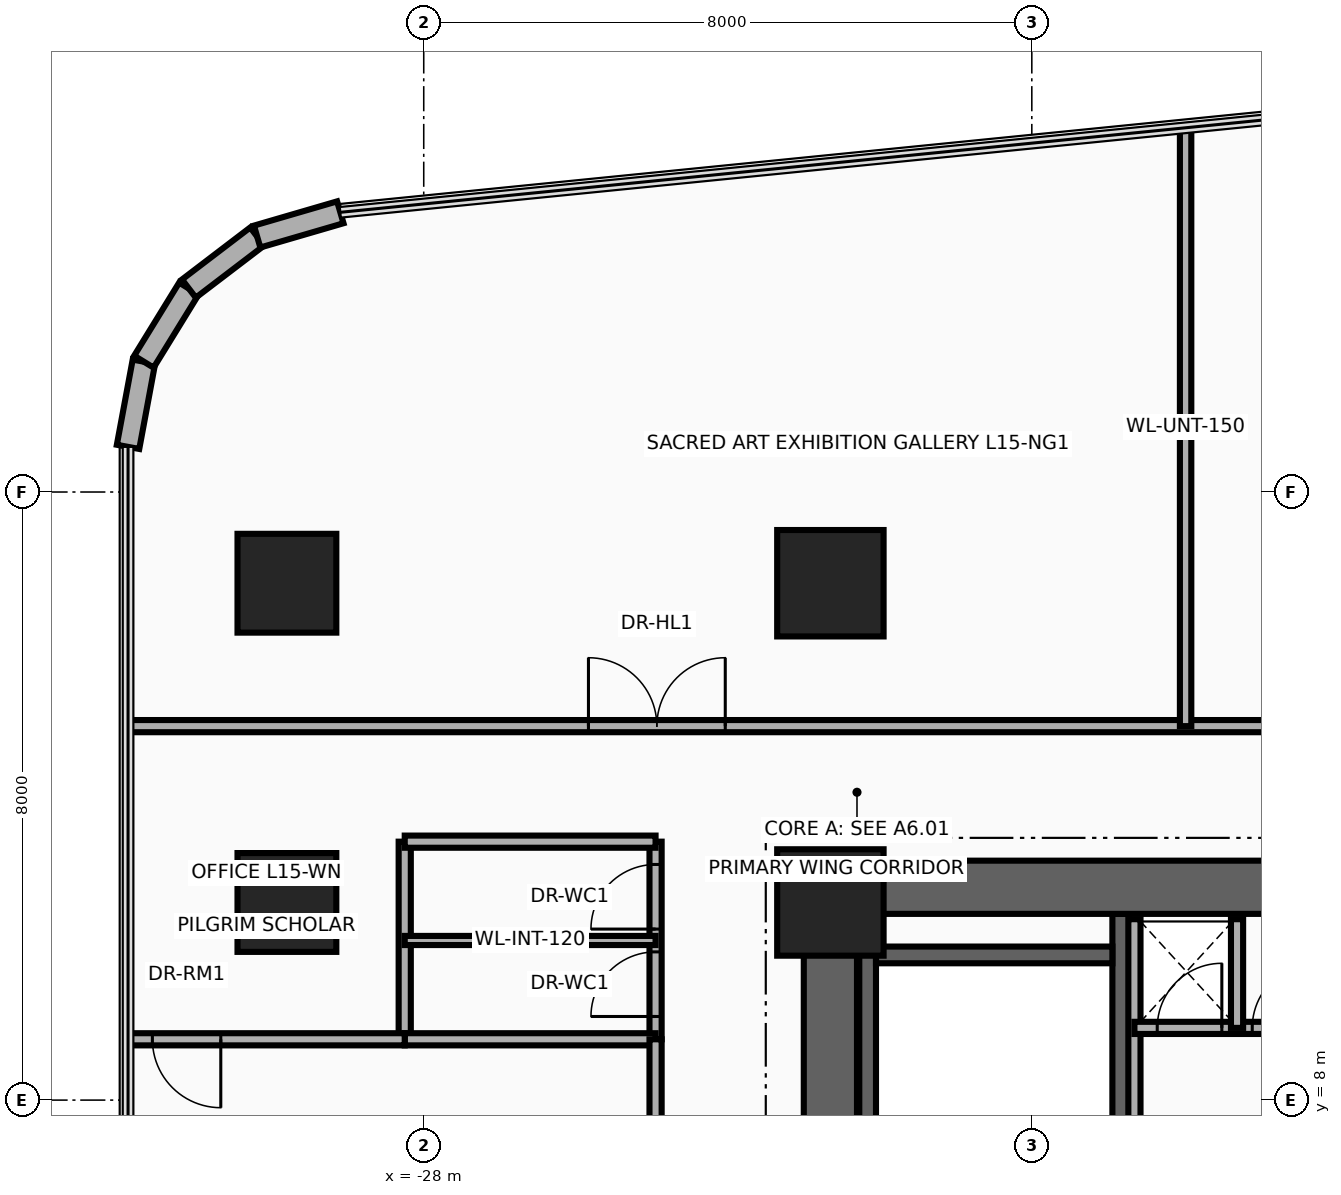
"""IFC4 building model, lengths in metres.
Left out: names, types, materials, properties, quantities, classifications, styles, units other than length and angle.
Written with IfcOpenShell. Run it as: python <this file> out.ifc"""

import sys

from ifc_helpers import new_model, si_unit, direction, frame, frame_2d, origin, origin_2d, place, context, subcontext, project, spatial, rectangle, circle, extrude, source, transform, mapped, element, fill, save


model = new_model("IFC4")
c1 = context("Model", 3, precision=1e-05, world=origin(), true_north=direction((0.0, 1.0)))
c2 = subcontext(c1, "Body", "Model", "MODEL_VIEW")
j1 = project(units=[si_unit("LENGTHUNIT", "METRE"), si_unit("PLANEANGLEUNIT", "RADIAN")], contexts=[c1])
p1 = place(None, origin())
s1 = spatial("IfcSite", under=j1, at=p1, CompositionType="ELEMENT")
p2 = place(p1, origin())
s2 = spatial("IfcBuilding", under=s1, at=p2, CompositionType="ELEMENT")
p3 = place(p2, frame((0.0, 0.0, 63.0)))
s3 = spatial("IfcBuildingStorey", under=s2, at=p3, CompositionType="ELEMENT", Elevation=63.0)
for number, where, z_axis, x_axis in (
    (1, (-22.16, 1.78, 0.0), (0.0, 0.0, 1.0), (0.0, 1.0, 0.0)),
    (2, (-18.83, 1.78, 0.0), (0.0, 0.0, 1.0), (0.0, 1.0, 0.0)),
):
    element("IfcWall", number, at=place(p3, frame(where, z_axis=z_axis, x_axis=x_axis)), inside=s3, PredefinedType="SHEAR", context=c2, shape_type="SweptSolid", body=[
        extrude(rectangle(XDim=8.67, YDim=0.22, at=frame_2d((4.335, 0.0))), origin(), (0.0, 0.0, 1.0), 3.46),
    ])
p4 = place(p3, frame((-22.05, 9.91, 0.0), z_axis=(0.0, 0.0, 1.0), x_axis=(1.0, 0.0, 0.0)))
e3 = element("IfcWall", 3, at=p4, inside=s3, PredefinedType="SHEAR", context=c2, shape_type="SweptSolid", body=[
    extrude(rectangle(XDim=3.11, YDim=0.22, at=frame_2d((1.555, 0.0))), origin(), (0.0, 0.0, 1.0), 3.46),
])
p5 = place(p3, frame((-22.65, -11.15, 0.0), z_axis=(0.0, 0.0, 1.0), x_axis=(0.0, 1.0, 0.0)))
e4 = element("IfcWall", 4, at=p5, inside=s3, PredefinedType="SHEAR", context=c2, shape_type="SweptSolid", body=[
    extrude(rectangle(XDim=22.3, YDim=0.7, at=frame_2d((11.15, 0.0))), origin(), (0.0, 0.0, 1.0), 3.46),
])
p6 = place(p3, frame((-22.65, 10.8, 0.0), z_axis=(0.0, 0.0, 1.0), x_axis=(1.0, 0.0, 0.0)))
e5 = element("IfcWall", 5, at=p6, inside=s3, PredefinedType="SHEAR", context=c2, shape_type="SweptSolid", body=[
    extrude(rectangle(XDim=10.25, YDim=0.7, at=frame_2d((5.125, 0.0))), origin(), (0.0, 0.0, 1.0), 3.46),
])
m1 = source(origin(), c2, "Body", "SweptSolid", [
    extrude(circle(Radius=0.65, at=origin_2d()), origin(), (0.0, 0.0, 1.0), 3.7),
])
p7 = place(p3, frame((-29.8, 10.6, 0.0), z_axis=(0.0, 0.0, 1.0), x_axis=(1.0, 0.0, 0.0)))
e6 = element("IfcColumn", 6, at=p7, inside=s3, PredefinedType="COLUMN", context=c2, shape_type="MappedRepresentation", body=[
    mapped(m1, transform((0.0, 0.0, 0.0), x_axis=(1.0, 0.0, 0.0), y_axis=(0.0, 1.0, 0.0), z_axis=(0.0, 0.0, 1.0), scale=1.0)),
])
m2 = source(origin(), c2, "Body", "SweptSolid", [
    extrude(rectangle(XDim=1.4, YDim=1.4, at=origin_2d()), origin(), (0.0, 0.0, 1.0), 3.7),
])
p8 = place(p3, frame((-22.65, 10.6, 0.0), z_axis=(0.0, 0.0, 1.0), x_axis=(1.0, 0.0, 0.0)))
e7 = element("IfcColumn", 7, at=p8, inside=s3, PredefinedType="COLUMN", context=c2, shape_type="MappedRepresentation", body=[
    mapped(m2, transform((0.0, 0.0, 0.0), x_axis=(1.0, 0.0, 0.0), y_axis=(0.0, 1.0, 0.0), z_axis=(0.0, 0.0, 1.0), scale=1.0)),
])
p9 = place(p3, frame((-29.8, 14.8, 0.0), z_axis=(0.0, 0.0, 1.0), x_axis=(1.0, 0.0, 0.0)))
e8 = element("IfcColumn", 8, at=p9, inside=s3, PredefinedType="COLUMN", context=c2, shape_type="MappedRepresentation", body=[
    mapped(m1, transform((0.0, 0.0, 0.0), x_axis=(1.0, 0.0, 0.0), y_axis=(0.0, 1.0, 0.0), z_axis=(0.0, 0.0, 1.0), scale=1.0)),
])
p10 = place(p3, frame((-22.65, 14.8, 0.0), z_axis=(0.0, 0.0, 1.0), x_axis=(1.0, 0.0, 0.0)))
e9 = element("IfcColumn", 9, at=p10, inside=s3, PredefinedType="COLUMN", context=c2, shape_type="MappedRepresentation", body=[
    mapped(m2, transform((0.0, 0.0, 0.0), x_axis=(1.0, 0.0, 0.0), y_axis=(0.0, 1.0, 0.0), z_axis=(0.0, 0.0, 1.0), scale=1.0)),
])
p11 = place(p3, frame((-31.89, 16.594, 0.0), z_axis=(0.0, 0.0, 1.0), x_axis=(0.182748995683, 0.9831596028, 0.0)))
e10 = element("IfcWall", 10, at=p11, inside=s3, PredefinedType="SOLIDWALL", context=c2, shape_type="SweptSolid", body=[
    extrude(rectangle(XDim=1.14, YDim=0.3, at=frame_2d((0.57, 0.0))), origin(), (0.0, 0.0, 1.0), 3.46),
])
p12 = place(p3, frame((-31.682, 17.714, 0.0), z_axis=(0.0, 0.0, 1.0), x_axis=(0.524157723014, 0.8516212077, 0.0)))
e11 = element("IfcWall", 11, at=p12, inside=s3, PredefinedType="SOLIDWALL", context=c2, shape_type="SweptSolid", body=[
    extrude(rectangle(XDim=1.129, YDim=0.3, at=frame_2d((0.565, 0.0))), origin(), (0.0, 0.0, 1.0), 3.46),
])
p13 = place(p3, frame((-31.09, 18.676, 0.0), z_axis=(0.0, 0.0, 1.0), x_axis=(0.795253002434, 0.606277710393, 0.0)))
e12 = element("IfcWall", 12, at=p13, inside=s3, PredefinedType="SOLIDWALL", context=c2, shape_type="SweptSolid", body=[
    extrude(rectangle(XDim=1.129, YDim=0.3, at=frame_2d((0.564, 0.0))), origin(), (0.0, 0.0, 1.0), 3.46),
])
p14 = place(p3, frame((-30.192, 19.361, 0.0), z_axis=(0.0, 0.0, 1.0), x_axis=(0.960071941549, 0.279753225271, 0.0)))
e13 = element("IfcWall", 13, at=p14, inside=s3, PredefinedType="SOLIDWALL", context=c2, shape_type="SweptSolid", body=[
    extrude(rectangle(XDim=1.14, YDim=0.3, at=frame_2d((0.57, 0.0))), origin(), (0.0, 0.0, 1.0), 3.46),
])
p15 = place(p3, frame((-18.65, 7.45, 0.0), z_axis=(0.0, 0.0, 1.0), x_axis=(0.0, 1.0, 0.0)))
e14 = element("IfcWall", 14, at=p15, inside=s3, PredefinedType="PARTITIONING", context=c2, shape_type="SweptSolid", body=[
    extrude(rectangle(XDim=2.93, YDim=0.16, at=frame_2d((1.465, 0.0))), origin(), (0.0, 0.0, 1.0), 3.46),
])
p16 = place(p3, frame((-18.65, 8.95, 0.0), z_axis=(0.0, 0.0, 1.0), x_axis=(1.0, 0.0, 0.0)))
e15 = element("IfcWall", 15, at=p16, inside=s3, PredefinedType="PARTITIONING", context=c2, shape_type="SweptSolid", body=[
    extrude(rectangle(XDim=5.5, YDim=0.16, at=frame_2d((2.75, 0.0))), origin(), (0.0, 0.0, 1.0), 3.46),
])
p17 = place(p16, frame((0.3, 0.0, 0.0)))
e16 = element("IfcOpeningElement", 16, at=p17, cuts=e15, PredefinedType="OPENING", context=c2, shape_type="SweptSolid", body=[
    extrude(rectangle(XDim=0.85, YDim=2.05, at=frame_2d((0.425, 1.025))), frame((0.0, 0.095, 0.0), z_axis=(0.0, -1.0, 0.0), x_axis=(1.0, 0.0, 0.0)), (0.0, 0.0, 1.0), 0.19),
])
p18 = place(p16, frame((1.55, 0.0, 0.0)))
e17 = element("IfcOpeningElement", 17, at=p18, cuts=e15, PredefinedType="OPENING", context=c2, shape_type="SweptSolid", body=[
    extrude(rectangle(XDim=0.85, YDim=2.05, at=frame_2d((0.425, 1.025))), frame((0.0, 0.095, 0.0), z_axis=(0.0, -1.0, 0.0), x_axis=(1.0, 0.0, 0.0)), (0.0, 0.0, 1.0), 0.19),
])
p19 = place(p16, frame((2.95, 0.0, 0.0)))
e18 = element("IfcOpeningElement", 18, at=p19, cuts=e15, PredefinedType="OPENING", context=c2, shape_type="SweptSolid", body=[
    extrude(rectangle(XDim=0.85, YDim=2.05, at=frame_2d((0.425, 1.025))), frame((0.0, 0.095, 0.0), z_axis=(0.0, -1.0, 0.0), x_axis=(1.0, 0.0, 0.0)), (0.0, 0.0, 1.0), 0.19),
])
p20 = place(p16, frame((4.35, 0.0, 0.0)))
e19 = element("IfcOpeningElement", 19, at=p20, cuts=e15, PredefinedType="OPENING", context=c2, shape_type="SweptSolid", body=[
    extrude(rectangle(XDim=0.85, YDim=2.05, at=frame_2d((0.425, 1.025))), frame((0.0, 0.095, 0.0), z_axis=(0.0, -1.0, 0.0), x_axis=(1.0, 0.0, 0.0)), (0.0, 0.0, 1.0), 0.19),
])
p21 = place(p3, frame((-17.3, 8.95, 0.0), z_axis=(0.0, 0.0, 1.0), x_axis=(0.0, 1.0, 0.0)))
e20 = element("IfcWall", 20, at=p21, inside=s3, PredefinedType="PARTITIONING", context=c2, shape_type="SweptSolid", body=[
    extrude(rectangle(XDim=1.43, YDim=0.16, at=frame_2d((0.715, 0.0))), origin(), (0.0, 0.0, 1.0), 3.46),
])
p22 = place(p3, frame((-28.25, 8.8, 0.0), z_axis=(0.0, 0.0, 1.0), x_axis=(0.0, 1.0, 0.0)))
e21 = element("IfcWall", 21, at=p22, inside=s3, PredefinedType="PARTITIONING", context=c2, shape_type="SweptSolid", body=[
    extrude(rectangle(XDim=2.6, YDim=0.16, at=frame_2d((1.3, 0.0))), origin(), (0.0, 0.0, 1.0), 2.583),
])
p23 = place(p3, frame((-24.95, 8.8, 0.0), z_axis=(0.0, 0.0, 1.0), x_axis=(0.0, 1.0, 0.0)))
e22 = element("IfcWall", 22, at=p23, inside=s3, PredefinedType="PARTITIONING", context=c2, shape_type="SweptSolid", body=[
    extrude(rectangle(XDim=2.6, YDim=0.16, at=frame_2d((1.3, 0.0))), origin(), (0.0, 0.0, 1.0), 2.583),
])
p24 = place(p23, frame((0.3, 0.0, 0.0)))
e23 = element("IfcOpeningElement", 23, at=p24, cuts=e22, PredefinedType="OPENING", context=c2, shape_type="SweptSolid", body=[
    extrude(rectangle(XDim=0.85, YDim=2.1, at=frame_2d((0.425, 1.05))), frame((0.0, 0.095, 0.0), z_axis=(0.0, -1.0, 0.0), x_axis=(1.0, 0.0, 0.0)), (0.0, 0.0, 1.0), 0.19),
])
p25 = place(p23, frame((1.45, 0.0, 0.0)))
e24 = element("IfcOpeningElement", 24, at=p25, cuts=e22, PredefinedType="OPENING", context=c2, shape_type="SweptSolid", body=[
    extrude(rectangle(XDim=0.85, YDim=2.1, at=frame_2d((0.425, 1.05))), frame((0.0, 0.095, 0.0), z_axis=(0.0, -1.0, 0.0), x_axis=(1.0, 0.0, 0.0)), (0.0, 0.0, 1.0), 0.19),
])
for number, where, z_axis, x_axis in (
    (25, (-28.25, 8.8, 0.0), (0.0, 0.0, 1.0), (1.0, 0.0, 0.0)),
    (26, (-28.25, 11.4, 0.0), (0.0, 0.0, 1.0), (1.0, 0.0, 0.0)),
):
    element("IfcWall", number, at=place(p3, frame(where, z_axis=z_axis, x_axis=x_axis)), inside=s3, PredefinedType="PARTITIONING", context=c2, shape_type="SweptSolid", body=[
        extrude(rectangle(XDim=3.3, YDim=0.16, at=frame_2d((1.65, 0.0))), origin(), (0.0, 0.0, 1.0), 3.46),
    ])
p26 = place(p3, frame((-28.25, 10.1, 0.0), z_axis=(0.0, 0.0, 1.0), x_axis=(1.0, 0.0, 0.0)))
e27 = element("IfcWall", 27, at=p26, inside=s3, PredefinedType="PARTITIONING", context=c2, shape_type="SweptSolid", body=[
    extrude(rectangle(XDim=3.3, YDim=0.12, at=frame_2d((1.65, 0.0))), origin(), (0.0, 0.0, 1.0), 3.46),
])
p27 = place(p3, frame((-24.95, -11.42, 0.0), z_axis=(0.0, 0.0, 1.0), x_axis=(0.0, 1.0, 0.0)))
e28 = element("IfcWall", 28, at=p27, inside=s3, PredefinedType="PARTITIONING", context=c2, shape_type="SweptSolid", body=[
    extrude(rectangle(XDim=20.22, YDim=0.16, at=frame_2d((10.11, 0.0))), origin(), (0.0, 0.0, 1.0), 2.583),
])
p28 = place(p27, frame((4.155, 0.0, 0.0)))
e29 = element("IfcOpeningElement", 29, at=p28, cuts=e28, PredefinedType="OPENING", context=c2, shape_type="SweptSolid", body=[
    extrude(rectangle(XDim=1.8, YDim=2.15, at=frame_2d((0.9, 1.075))), frame((0.0, 0.095, 0.0), z_axis=(0.0, -1.0, 0.0), x_axis=(1.0, 0.0, 0.0)), (0.0, 0.0, 1.0), 0.19),
])
p29 = place(p27, frame((14.265, 0.0, 0.0)))
e30 = element("IfcOpeningElement", 30, at=p29, cuts=e28, PredefinedType="OPENING", context=c2, shape_type="SweptSolid", body=[
    extrude(rectangle(XDim=1.8, YDim=2.15, at=frame_2d((0.9, 1.075))), frame((0.0, 0.095, 0.0), z_axis=(0.0, -1.0, 0.0), x_axis=(1.0, 0.0, 0.0)), (0.0, 0.0, 1.0), 0.19),
])
p30 = place(p3, frame((-31.89, 8.8, 0.0), z_axis=(0.0, 0.0, 1.0), x_axis=(1.0, 0.0, 0.0)))
e31 = element("IfcWall", 31, at=p30, inside=s3, PredefinedType="PARTITIONING", context=c2, shape_type="SweptSolid", body=[
    extrude(rectangle(XDim=3.64, YDim=0.16, at=frame_2d((1.82, 0.0))), origin(), (0.0, 0.0, 1.0), 2.896),
])
p31 = place(p30, frame((0.32, 0.0, 0.0)))
e32 = element("IfcOpeningElement", 32, at=p31, cuts=e31, PredefinedType="OPENING", context=c2, shape_type="SweptSolid", body=[
    extrude(rectangle(XDim=0.9, YDim=2.1, at=frame_2d((0.45, 1.05))), frame((0.0, 0.095, 0.0), z_axis=(0.0, -1.0, 0.0), x_axis=(1.0, 0.0, 0.0)), (0.0, 0.0, 1.0), 0.19),
])
p32 = place(p3, frame((-31.89, 12.92, 0.0), z_axis=(0.0, 0.0, 1.0), x_axis=(1.0, 0.0, 0.0)))
e33 = element("IfcWall", 33, at=p32, inside=s3, PredefinedType="PARTITIONING", context=c2, shape_type="SweptSolid", body=[
    extrude(rectangle(XDim=45.44, YDim=0.16, at=frame_2d((22.72, 0.0))), origin(), (0.0, 0.0, 1.0), 2.583),
])
p33 = place(p32, frame((6.057, 0.0, 0.0)))
e34 = element("IfcOpeningElement", 34, at=p33, cuts=e33, PredefinedType="OPENING", context=c2, shape_type="SweptSolid", body=[
    extrude(rectangle(XDim=1.8, YDim=2.15, at=frame_2d((0.9, 1.075))), frame((0.0, 0.095, 0.0), z_axis=(0.0, -1.0, 0.0), x_axis=(1.0, 0.0, 0.0)), (0.0, 0.0, 1.0), 0.19),
])
p34 = place(p32, frame((20.895, 0.0, 0.0)))
e35 = element("IfcOpeningElement", 35, at=p34, cuts=e33, PredefinedType="OPENING", context=c2, shape_type="SweptSolid", body=[
    extrude(rectangle(XDim=1.8, YDim=2.15, at=frame_2d((0.9, 1.075))), frame((0.0, 0.095, 0.0), z_axis=(0.0, -1.0, 0.0), x_axis=(1.0, 0.0, 0.0)), (0.0, 0.0, 1.0), 0.19),
])
p35 = place(p32, frame((36.658, 0.0, 0.0)))
e36 = element("IfcOpeningElement", 36, at=p35, cuts=e33, PredefinedType="OPENING", context=c2, shape_type="SweptSolid", body=[
    extrude(rectangle(XDim=1.8, YDim=2.15, at=frame_2d((0.9, 1.075))), frame((0.0, 0.095, 0.0), z_axis=(0.0, -1.0, 0.0), x_axis=(1.0, 0.0, 0.0)), (0.0, 0.0, 1.0), 0.19),
])
p36 = place(p3, frame((-17.977, 12.92, 0.0), z_axis=(0.0, 0.0, 1.0), x_axis=(0.0, 1.0, 0.0)))
e37 = element("IfcWall", 37, at=p36, inside=s3, PredefinedType="PARTITIONING", context=c2, shape_type="SweptSolid", body=[
    extrude(rectangle(XDim=7.872, YDim=0.15, at=frame_2d((3.936, 0.0))), origin(), (0.0, 0.0, 1.0), 2.583),
])
p37 = place(p17, origin())
e38 = element("IfcDoor", 38, at=p37, inside=s3, OperationType="SINGLE_SWING_LEFT", PredefinedType="DOOR", context=c2, shape_type="SweptSolid", body=[
    extrude(rectangle(XDim=0.85, YDim=2.05, at=frame_2d((0.425, 1.025))), frame((0.0, 0.025, 0.0), z_axis=(0.0, -1.0, 0.0), x_axis=(1.0, 0.0, 0.0)), (0.0, 0.0, 1.0), 0.05),
])
fill(e16, e38)
p38 = place(p18, origin())
e39 = element("IfcDoor", 39, at=p38, inside=s3, OperationType="SINGLE_SWING_RIGHT", PredefinedType="DOOR", context=c2, shape_type="SweptSolid", body=[
    extrude(rectangle(XDim=0.85, YDim=2.05, at=frame_2d((0.425, 1.025))), frame((0.0, 0.025, 0.0), z_axis=(0.0, -1.0, 0.0), x_axis=(1.0, 0.0, 0.0)), (0.0, 0.0, 1.0), 0.05),
])
fill(e17, e39)
p39 = place(p24, origin())
e40 = element("IfcDoor", 40, at=p39, inside=s3, OperationType="SINGLE_SWING_LEFT", PredefinedType="DOOR", context=c2, shape_type="SweptSolid", body=[
    extrude(rectangle(XDim=0.85, YDim=2.1, at=frame_2d((0.425, 1.05))), frame((0.0, 0.025, 0.0), z_axis=(0.0, -1.0, 0.0), x_axis=(1.0, 0.0, 0.0)), (0.0, 0.0, 1.0), 0.05),
])
fill(e23, e40)
p40 = place(p25, origin())
e41 = element("IfcDoor", 41, at=p40, inside=s3, OperationType="SINGLE_SWING_RIGHT", PredefinedType="DOOR", context=c2, shape_type="SweptSolid", body=[
    extrude(rectangle(XDim=0.85, YDim=2.1, at=frame_2d((0.425, 1.05))), frame((0.0, 0.025, 0.0), z_axis=(0.0, -1.0, 0.0), x_axis=(1.0, 0.0, 0.0)), (0.0, 0.0, 1.0), 0.05),
])
fill(e24, e41)
p41 = place(p31, frame((0.9, 0.0, 0.0), z_axis=(0.0, 0.0, 1.0), x_axis=(-1.0, 0.0, 0.0)))
e42 = element("IfcDoor", 42, at=p41, inside=s3, OperationType="SINGLE_SWING_LEFT", PredefinedType="DOOR", context=c2, shape_type="SweptSolid", body=[
    extrude(rectangle(XDim=0.9, YDim=2.1, at=frame_2d((0.45, 1.05))), frame((0.0, 0.025, 0.0), z_axis=(0.0, -1.0, 0.0), x_axis=(1.0, 0.0, 0.0)), (0.0, 0.0, 1.0), 0.05),
])
fill(e32, e42)
p42 = place(p33, origin())
e43 = element("IfcDoor", 43, at=p42, inside=s3, OperationType="DOUBLE_DOOR_SINGLE_SWING", PredefinedType="DOOR", context=c2, shape_type="SweptSolid", body=[
    extrude(rectangle(XDim=1.8, YDim=2.15, at=frame_2d((0.9, 1.075))), frame((0.0, 0.025, 0.0), z_axis=(0.0, -1.0, 0.0), x_axis=(1.0, 0.0, 0.0)), (0.0, 0.0, 1.0), 0.05),
])
fill(e34, e43)
save(model, sys.argv[1])
